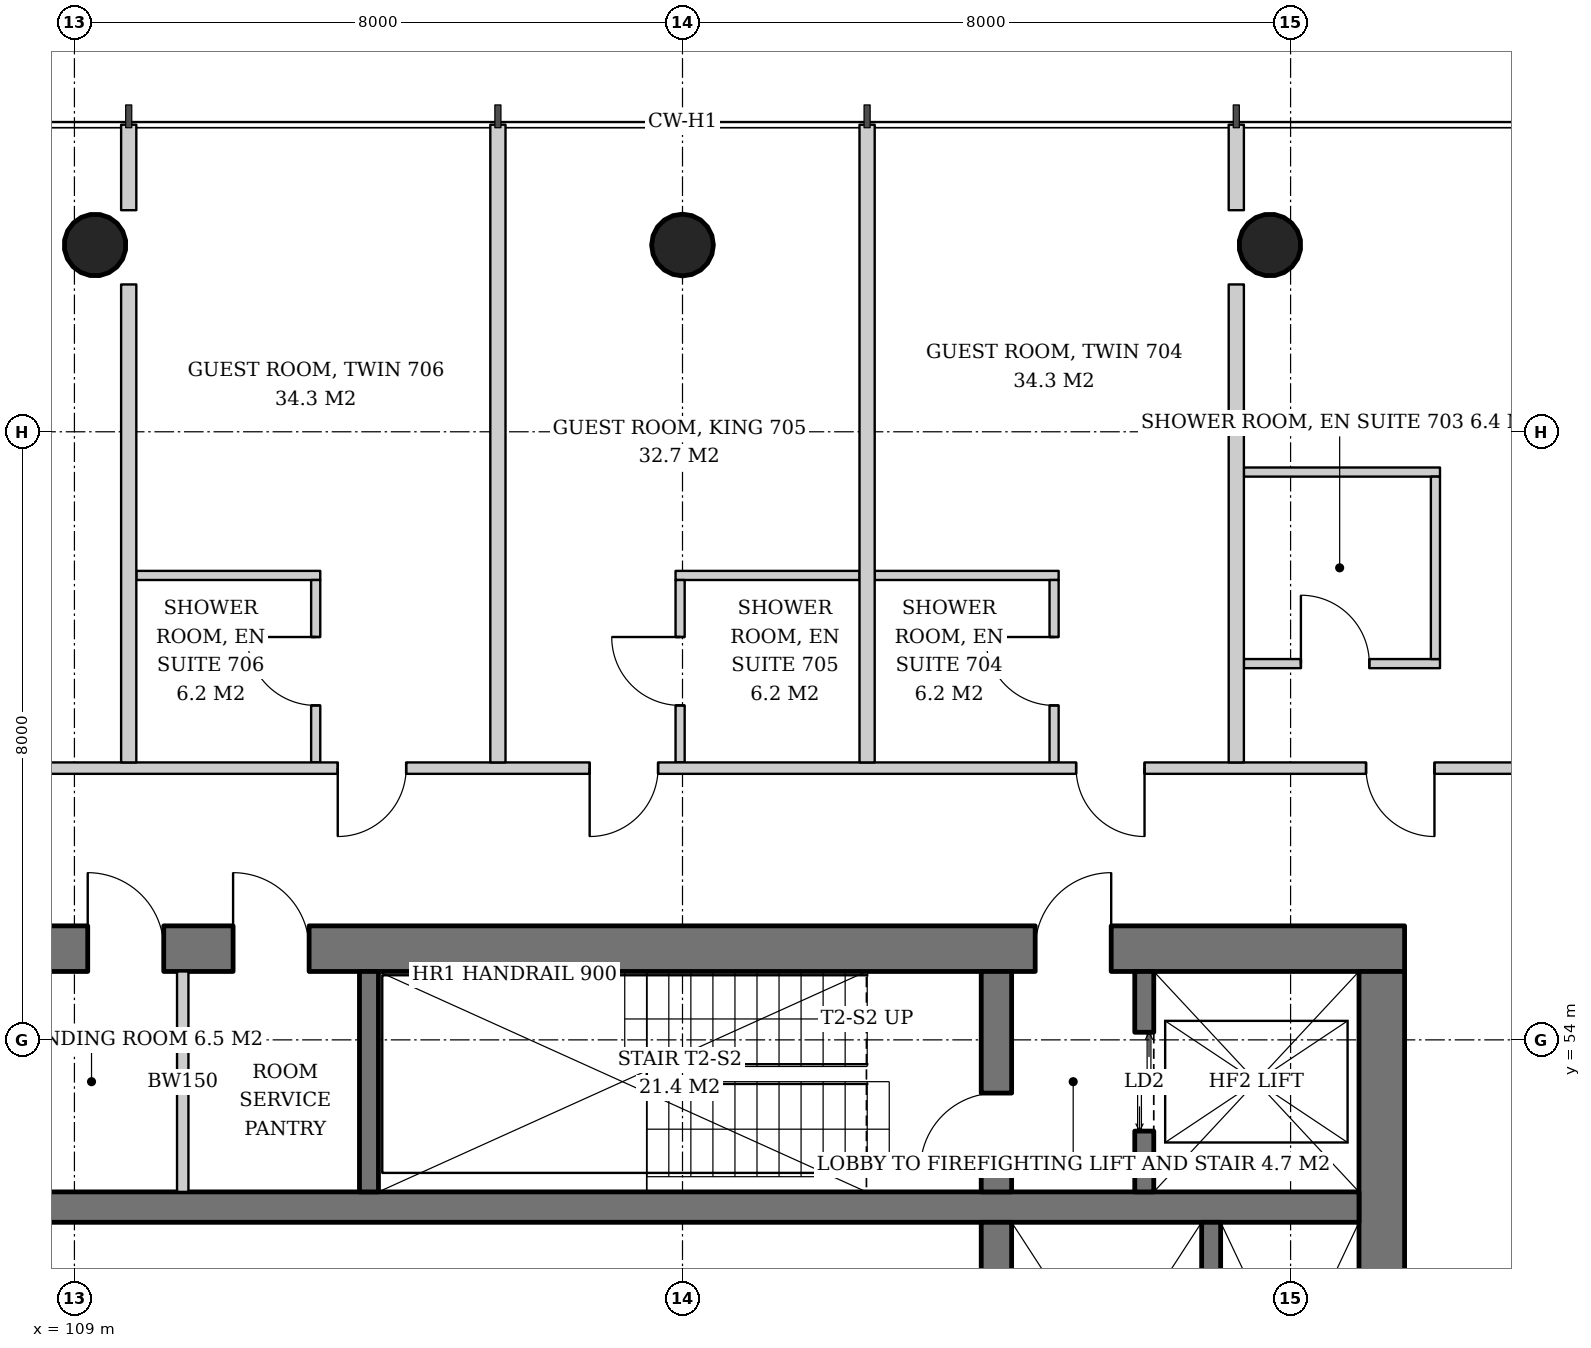
"""IFC4 building model, lengths in metres.
Left out: names, types, materials, properties, quantities, classifications, styles, units other than length and angle.
Written with IfcOpenShell. Run it as: python <this file> out.ifc"""

import sys

from ifc_helpers import new_model, si_unit, direction, frame, frame_2d, origin, origin_2d, place, context, subcontext, project, spatial, rectangle, hollow_circle, extrude, element, fill, save


model = new_model("IFC4")
c1 = context("Model", 3, precision=1e-05, world=origin(), true_north=direction((0.0, 1.0)))
c2 = subcontext(c1, "Body", "Model", "MODEL_VIEW")
j1 = project(units=[si_unit("LENGTHUNIT", "METRE"), si_unit("PLANEANGLEUNIT", "RADIAN")], contexts=[c1])
p1 = place(None, origin())
s1 = spatial("IfcSite", under=j1, at=p1, CompositionType="ELEMENT")
p2 = place(p1, origin())
s2 = spatial("IfcBuilding", under=s1, at=p2, CompositionType="ELEMENT")
p3 = place(p2, frame((0.0, 0.0, 32.4)))
s3 = spatial("IfcBuildingStorey", under=s2, at=p3, CompositionType="ELEMENT", Elevation=32.4)
p4 = place(p3, frame((124.754, 64.509, 0.0), z_axis=(-0.021561848751, -0.043059525333, 0.998839808957), x_axis=(0.894160516368, -0.44774654769, 0.0)))
e1 = element("IfcColumn", 1, at=p4, inside=s3, PredefinedType="COLUMN", context=c2, shape_type="SweptSolid", body=[
    extrude(hollow_circle(Radius=0.406, WallThickness=0.03, at=origin_2d()), origin(), (0.0, 0.0, 1.0), 3.804),
])
p5 = place(p3, frame((117.0, 64.509, 0.0), z_axis=(0.0, -0.043069538298, 0.999072076915), x_axis=(1.0, 0.0, 0.0)))
e2 = element("IfcColumn", 2, at=p5, inside=s3, PredefinedType="COLUMN", context=c2, shape_type="SweptSolid", body=[
    extrude(hollow_circle(Radius=0.406, WallThickness=0.03, at=origin_2d()), origin(), (0.0, 0.0, 1.0), 3.803),
])
p6 = place(p3, frame((109.246, 64.509, 0.0), z_axis=(0.021561848751, -0.043059525333, 0.998839808957), x_axis=(0.894160516368, 0.44774654769, 0.0)))
e3 = element("IfcColumn", 3, at=p6, inside=s3, PredefinedType="COLUMN", context=c2, shape_type="SweptSolid", body=[
    extrude(hollow_circle(Radius=0.406, WallThickness=0.03, at=origin_2d()), origin(), (0.0, 0.0, 1.0), 3.804),
])
p7 = place(p3, frame((107.5, 55.2, 0.0), z_axis=(0.0, 0.0, 1.0), x_axis=(1.0, 0.0, 0.0)))
e4 = element("IfcWall", 4, at=p7, inside=s3, PredefinedType="SHEAR", context=c2, shape_type="SweptSolid", body=[
    extrude(rectangle(XDim=19.0, YDim=0.6, at=frame_2d((9.5, 0.0))), origin(), (0.0, 0.0, 1.0), 3.8),
])
p8 = place(p7, frame((14.14, 0.0, 0.0)))
e5 = element("IfcOpeningElement", 5, at=p8, cuts=e4, PredefinedType="OPENING", context=c2, shape_type="SweptSolid", body=[
    extrude(rectangle(XDim=1.0, YDim=2.1, at=frame_2d((0.5, 1.05))), frame((0.0, 0.31, 0.0), z_axis=(0.0, -1.0, 0.0), x_axis=(1.0, 0.0, 0.0)), (0.0, 0.0, 1.0), 0.62),
])
p9 = place(p7, frame((1.675, 0.0, 0.0)))
e6 = element("IfcOpeningElement", 6, at=p9, cuts=e4, PredefinedType="OPENING", context=c2, shape_type="SweptSolid", body=[
    extrude(rectangle(XDim=1.0, YDim=2.1, at=frame_2d((0.5, 1.05))), frame((0.0, 0.31, 0.0), z_axis=(0.0, -1.0, 0.0), x_axis=(1.0, 0.0, 0.0)), (0.0, 0.0, 1.0), 0.62),
])
p10 = place(p7, frame((3.587, 0.0, 0.0)))
e7 = element("IfcOpeningElement", 7, at=p10, cuts=e4, PredefinedType="OPENING", context=c2, shape_type="SweptSolid", body=[
    extrude(rectangle(XDim=1.0, YDim=2.1, at=frame_2d((0.5, 1.05))), frame((0.0, 0.31, 0.0), z_axis=(0.0, -1.0, 0.0), x_axis=(1.0, 0.0, 0.0)), (0.0, 0.0, 1.0), 0.62),
])
p11 = place(p3, frame((126.2, 37.1, 0.0), z_axis=(0.0, 0.0, 1.0), x_axis=(0.0, 1.0, 0.0)))
e8 = element("IfcWall", 8, at=p11, inside=s3, PredefinedType="SHEAR", context=c2, shape_type="SweptSolid", body=[
    extrude(rectangle(XDim=17.8, YDim=0.6, at=frame_2d((8.9, 0.0))), origin(), (0.0, 0.0, 1.0), 3.8),
])
p12 = place(p11, frame((8.0, 0.0, 0.0)))
e9 = element("IfcOpeningElement", 9, at=p12, cuts=e8, PredefinedType="OPENING", context=c2, shape_type="SweptSolid", body=[
    extrude(rectangle(XDim=1.8, YDim=2.4, at=frame_2d((0.9, 1.2))), frame((0.0, 0.31, 0.0), z_axis=(0.0, -1.0, 0.0), x_axis=(1.0, 0.0, 0.0)), (0.0, 0.0, 1.0), 0.62),
])
p13 = place(p3, frame((108.1, 51.8, 0.0), z_axis=(0.0, 0.0, 1.0), x_axis=(1.0, 0.0, 0.0)))
e10 = element("IfcWall", 10, at=p13, inside=s3, PredefinedType="SHEAR", context=c2, shape_type="SweptSolid", body=[
    extrude(rectangle(XDim=17.8, YDim=0.4, at=frame_2d((8.9, 0.0))), origin(), (0.0, 0.0, 1.0), 3.8),
])
p14 = place(p3, frame((121.13, 40.4, 0.0), z_axis=(0.0, 0.0, 1.0), x_axis=(0.0, 1.0, 0.0)))
e11 = element("IfcWall", 11, at=p14, inside=s3, PredefinedType="SHEAR", context=c2, shape_type="SweptSolid", body=[
    extrude(rectangle(XDim=11.2, YDim=0.4, at=frame_2d((5.6, 0.0))), origin(), (0.0, 0.0, 1.0), 3.8),
])
p15 = place(p3, frame((121.13, 52.0, 0.0), z_axis=(0.0, 0.0, 1.0), x_axis=(0.0, 1.0, 0.0)))
e12 = element("IfcWall", 12, at=p15, inside=s3, PredefinedType="SHEAR", context=c2, shape_type="SweptSolid", body=[
    extrude(rectangle(XDim=2.9, YDim=0.4, at=frame_2d((1.45, 0.0))), origin(), (0.0, 0.0, 1.0), 3.8),
])
p16 = place(p15, frame((0.3, 0.0, 0.0)))
e13 = element("IfcOpeningElement", 13, at=p16, cuts=e12, PredefinedType="OPENING", context=c2, shape_type="SweptSolid", body=[
    extrude(rectangle(XDim=1.0, YDim=2.1, at=frame_2d((0.5, 1.05))), frame((0.0, 0.21, 0.0), z_axis=(0.0, -1.0, 0.0), x_axis=(1.0, 0.0, 0.0)), (0.0, 0.0, 1.0), 0.42),
])
p17 = place(p3, frame((112.875, 52.0, 0.0), z_axis=(0.0, 0.0, 1.0), x_axis=(0.0, 1.0, 0.0)))
e14 = element("IfcWall", 14, at=p17, inside=s3, PredefinedType="SHEAR", context=c2, shape_type="SweptSolid", body=[
    extrude(rectangle(XDim=2.9, YDim=0.25, at=frame_2d((1.45, 0.0))), origin(), (0.0, 0.0, 1.0), 3.8),
])
p18 = place(p3, frame((123.075, 52.0, 0.0), z_axis=(0.0, 0.0, 1.0), x_axis=(0.0, 1.0, 0.0)))
e15 = element("IfcWall", 15, at=p18, inside=s3, PredefinedType="SHEAR", context=c2, shape_type="SweptSolid", body=[
    extrude(rectangle(XDim=2.9, YDim=0.25, at=frame_2d((1.45, 0.0))), origin(), (0.0, 0.0, 1.0), 3.8),
])
p19 = place(p18, frame((0.8, 0.0, 0.0)))
e16 = element("IfcOpeningElement", 16, at=p19, cuts=e15, PredefinedType="OPENING", context=c2, shape_type="SweptSolid", body=[
    extrude(rectangle(XDim=1.3, YDim=2.2, at=frame_2d((0.65, 1.1))), frame((0.0, 0.135, 0.0), z_axis=(0.0, -1.0, 0.0), x_axis=(1.0, 0.0, 0.0)), (0.0, 0.0, 1.0), 0.27),
])
p20 = place(p3, frame((123.955, 47.75, 0.0), z_axis=(0.0, 0.0, 1.0), x_axis=(0.0, 1.0, 0.0)))
e17 = element("IfcWall", 17, at=p20, inside=s3, PredefinedType="SHEAR", context=c2, shape_type="SweptSolid", body=[
    extrude(rectangle(XDim=3.85, YDim=0.25, at=frame_2d((1.925, 0.0))), origin(), (0.0, 0.0, 1.0), 3.8),
])
p21 = place(p3, frame((110.425, 52.0, 0.0), z_axis=(0.0, 0.0, 1.0), x_axis=(0.0, 1.0, 0.0)))
e18 = element("IfcWall", 18, at=p21, inside=s3, PredefinedType="SOLIDWALL", context=c2, shape_type="SweptSolid", body=[
    extrude(rectangle(XDim=2.9, YDim=0.15, at=frame_2d((1.45, 0.0))), origin(), (0.0, 0.0, 1.0), 3.6),
])
p22 = place(p3, frame((124.386, 58.95, 0.0), z_axis=(0.0, 0.0, 1.0), x_axis=(1.0, 0.0, 0.0)))
e19 = element("IfcWall", 19, at=p22, inside=s3, PredefinedType="PARTITIONING", context=c2, shape_type="SweptSolid", body=[
    extrude(rectangle(XDim=2.58, YDim=0.12, at=frame_2d((1.29, 0.0))), origin(), (0.0, 0.0, 1.0), 2.8),
])
p23 = place(p22, frame((0.75, 0.0, 0.0)))
e20 = element("IfcOpeningElement", 20, at=p23, cuts=e19, PredefinedType="OPENING", context=c2, shape_type="SweptSolid", body=[
    extrude(rectangle(XDim=0.9, YDim=2.1, at=frame_2d((0.45, 1.05))), frame((0.0, 0.07, 0.0), z_axis=(0.0, -1.0, 0.0), x_axis=(1.0, 0.0, 0.0)), (0.0, 0.0, 1.0), 0.14),
])
p24 = place(p3, frame((124.386, 61.47, 0.0), z_axis=(0.0, 0.0, 1.0), x_axis=(1.0, 0.0, 0.0)))
e21 = element("IfcWall", 21, at=p24, inside=s3, PredefinedType="PARTITIONING", context=c2, shape_type="SweptSolid", body=[
    extrude(rectangle(XDim=2.58, YDim=0.12, at=frame_2d((1.29, 0.0))), origin(), (0.0, 0.0, 1.0), 2.8),
])
p25 = place(p3, frame((126.906, 59.01, 0.0), z_axis=(0.0, 0.0, 1.0), x_axis=(0.0, 1.0, 0.0)))
e22 = element("IfcWall", 22, at=p25, inside=s3, PredefinedType="PARTITIONING", context=c2, shape_type="SweptSolid", body=[
    extrude(rectangle(XDim=2.4, YDim=0.12, at=frame_2d((1.2, 0.0))), origin(), (0.0, 0.0, 1.0), 2.847),
])
p26 = place(p3, frame((121.948, 60.11, 0.0), z_axis=(0.0, 0.0, 1.0), x_axis=(-1.0, 0.0, 0.0)))
e23 = element("IfcWall", 23, at=p26, inside=s3, PredefinedType="PARTITIONING", context=c2, shape_type="SweptSolid", body=[
    extrude(rectangle(XDim=2.42, YDim=0.12, at=frame_2d((1.21, 0.0))), origin(), (0.0, 0.0, 1.0), 3.6),
])
p27 = place(p3, frame((121.889, 57.65, 0.0), z_axis=(0.0, 0.0, 1.0), x_axis=(0.0, 1.0, 0.0)))
e24 = element("IfcWall", 24, at=p27, inside=s3, PredefinedType="PARTITIONING", context=c2, shape_type="SweptSolid", body=[
    extrude(rectangle(XDim=2.4, YDim=0.12, at=frame_2d((1.2, 0.0))), origin(), (0.0, 0.0, 1.0), 3.6),
])
p28 = place(p27, frame((0.75, 0.0, 0.0)))
e25 = element("IfcOpeningElement", 25, at=p28, cuts=e24, PredefinedType="OPENING", context=c2, shape_type="SweptSolid", body=[
    extrude(rectangle(XDim=0.9, YDim=2.1, at=frame_2d((0.45, 1.05))), frame((0.0, 0.07, 0.0), z_axis=(0.0, -1.0, 0.0), x_axis=(1.0, 0.0, 0.0)), (0.0, 0.0, 1.0), 0.14),
])
p29 = place(p3, frame((119.329, 60.11, 0.0), z_axis=(0.0, 0.0, 1.0), x_axis=(-1.0, 0.0, 0.0)))
e26 = element("IfcWall", 26, at=p29, inside=s3, PredefinedType="PARTITIONING", context=c2, shape_type="SweptSolid", body=[
    extrude(rectangle(XDim=2.42, YDim=0.12, at=frame_2d((1.21, 0.0))), origin(), (0.0, 0.0, 1.0), 2.847),
])
p30 = place(p3, frame((116.969, 57.65, 0.0), z_axis=(0.0, 0.0, 1.0), x_axis=(0.0, 1.0, 0.0)))
e27 = element("IfcWall", 27, at=p30, inside=s3, PredefinedType="PARTITIONING", context=c2, shape_type="SweptSolid", body=[
    extrude(rectangle(XDim=2.4, YDim=0.12, at=frame_2d((1.2, 0.0))), origin(), (0.0, 0.0, 1.0), 3.6),
])
p31 = place(p30, frame((0.75, 0.0, 0.0)))
e28 = element("IfcOpeningElement", 28, at=p31, cuts=e27, PredefinedType="OPENING", context=c2, shape_type="SweptSolid", body=[
    extrude(rectangle(XDim=0.9, YDim=2.1, at=frame_2d((0.45, 1.05))), frame((0.0, 0.07, 0.0), z_axis=(0.0, -1.0, 0.0), x_axis=(1.0, 0.0, 0.0)), (0.0, 0.0, 1.0), 0.14),
])
p32 = place(p3, frame((112.234, 60.11, 0.0), z_axis=(0.0, 0.0, 1.0), x_axis=(-1.0, 0.0, 0.0)))
e29 = element("IfcWall", 29, at=p32, inside=s3, PredefinedType="PARTITIONING", context=c2, shape_type="SweptSolid", body=[
    extrude(rectangle(XDim=2.42, YDim=0.12, at=frame_2d((1.21, 0.0))), origin(), (0.0, 0.0, 1.0), 2.847),
])
p33 = place(p3, frame((112.174, 57.65, 0.0), z_axis=(0.0, 0.0, 1.0), x_axis=(0.0, 1.0, 0.0)))
e30 = element("IfcWall", 30, at=p33, inside=s3, PredefinedType="PARTITIONING", context=c2, shape_type="SweptSolid", body=[
    extrude(rectangle(XDim=2.4, YDim=0.12, at=frame_2d((1.2, 0.0))), origin(), (0.0, 0.0, 1.0), 3.6),
])
p34 = place(p33, frame((0.75, 0.0, 0.0)))
e31 = element("IfcOpeningElement", 31, at=p34, cuts=e30, PredefinedType="OPENING", context=c2, shape_type="SweptSolid", body=[
    extrude(rectangle(XDim=0.9, YDim=2.1, at=frame_2d((0.45, 1.05))), frame((0.0, 0.07, 0.0), z_axis=(0.0, -1.0, 0.0), x_axis=(1.0, 0.0, 0.0)), (0.0, 0.0, 1.0), 0.14),
])
p35 = place(p3, frame((128.65, 57.575, 0.0), z_axis=(0.0, 0.0, 1.0), x_axis=(-1.0, 0.0, 0.0)))
e32 = element("IfcWall", 32, at=p35, inside=s3, PredefinedType="PARTITIONING", context=c2, shape_type="SweptSolid", body=[
    extrude(rectangle(XDim=23.15, YDim=0.15, at=frame_2d((11.575, 0.0))), origin(), (0.0, 0.0, 1.0), 2.8),
])
p36 = place(p35, frame((1.757, 0.0, 0.0)))
e33 = element("IfcOpeningElement", 33, at=p36, cuts=e32, PredefinedType="OPENING", context=c2, shape_type="SweptSolid", body=[
    extrude(rectangle(XDim=0.9, YDim=2.1, at=frame_2d((0.45, 1.05))), frame((0.0, 0.085, 0.0), z_axis=(0.0, -1.0, 0.0), x_axis=(1.0, 0.0, 0.0)), (0.0, 0.0, 1.0), 0.17),
])
p37 = place(p35, frame((5.572, 0.0, 0.0)))
e34 = element("IfcOpeningElement", 34, at=p37, cuts=e32, PredefinedType="OPENING", context=c2, shape_type="SweptSolid", body=[
    extrude(rectangle(XDim=0.9, YDim=2.1, at=frame_2d((0.45, 1.05))), frame((0.0, 0.085, 0.0), z_axis=(0.0, -1.0, 0.0), x_axis=(1.0, 0.0, 0.0)), (0.0, 0.0, 1.0), 0.17),
])
p38 = place(p35, frame((11.971, 0.0, 0.0)))
e35 = element("IfcOpeningElement", 35, at=p38, cuts=e32, PredefinedType="OPENING", context=c2, shape_type="SweptSolid", body=[
    extrude(rectangle(XDim=0.9, YDim=2.1, at=frame_2d((0.45, 1.05))), frame((0.0, 0.085, 0.0), z_axis=(0.0, -1.0, 0.0), x_axis=(1.0, 0.0, 0.0)), (0.0, 0.0, 1.0), 0.17),
])
p39 = place(p35, frame((15.286, 0.0, 0.0)))
e36 = element("IfcOpeningElement", 36, at=p39, cuts=e32, PredefinedType="OPENING", context=c2, shape_type="SweptSolid", body=[
    extrude(rectangle(XDim=0.9, YDim=2.1, at=frame_2d((0.45, 1.05))), frame((0.0, 0.085, 0.0), z_axis=(0.0, -1.0, 0.0), x_axis=(1.0, 0.0, 0.0)), (0.0, 0.0, 1.0), 0.17),
])
p40 = place(p3, frame((124.286, 57.65, 0.0), z_axis=(0.0, 0.0, 1.0), x_axis=(0.0, 1.0, 0.0)))
e37 = element("IfcWall", 37, at=p40, inside=s3, PredefinedType="PARTITIONING", context=c2, shape_type="SweptSolid", body=[
    extrude(rectangle(XDim=6.288, YDim=0.2, at=frame_2d((3.144, 0.0))), origin(), (0.0, 0.0, 1.0), 3.6),
])
p41 = place(p3, frame((124.286, 64.915, 0.0), z_axis=(0.0, 0.0, 1.0), x_axis=(0.0, 1.0, 0.0)))
e38 = element("IfcWall", 38, at=p41, inside=s3, PredefinedType="PARTITIONING", context=c2, shape_type="SweptSolid", body=[
    extrude(rectangle(XDim=1.125, YDim=0.2, at=frame_2d((0.562, 0.0))), origin(), (0.0, 0.0, 1.0), 3.6),
])
p42 = place(p3, frame((119.428, 57.65, 0.0), z_axis=(0.0, 0.0, 1.0), x_axis=(0.0, 1.0, 0.0)))
e39 = element("IfcWall", 39, at=p42, inside=s3, PredefinedType="PARTITIONING", context=c2, shape_type="SweptSolid", body=[
    extrude(rectangle(XDim=8.39, YDim=0.2, at=frame_2d((4.195, 0.0))), origin(), (0.0, 0.0, 1.0), 3.05),
])
p43 = place(p3, frame((114.572, 57.65, 0.0), z_axis=(0.0, 0.0, 1.0), x_axis=(0.0, 1.0, 0.0)))
e40 = element("IfcWall", 40, at=p43, inside=s3, PredefinedType="PARTITIONING", context=c2, shape_type="SweptSolid", body=[
    extrude(rectangle(XDim=8.39, YDim=0.2, at=frame_2d((4.195, 0.0))), origin(), (0.0, 0.0, 1.0), 2.847),
])
p44 = place(p3, frame((109.714, 57.65, 0.0), z_axis=(0.0, 0.0, 1.0), x_axis=(0.0, 1.0, 0.0)))
e41 = element("IfcWall", 41, at=p44, inside=s3, PredefinedType="PARTITIONING", context=c2, shape_type="SweptSolid", body=[
    extrude(rectangle(XDim=6.288, YDim=0.2, at=frame_2d((3.144, 0.0))), origin(), (0.0, 0.0, 1.0), 3.6),
])
p45 = place(p3, frame((109.714, 64.915, 0.0), z_axis=(0.0, 0.0, 1.0), x_axis=(0.0, 1.0, 0.0)))
e42 = element("IfcWall", 42, at=p45, inside=s3, PredefinedType="PARTITIONING", context=c2, shape_type="SweptSolid", body=[
    extrude(rectangle(XDim=1.125, YDim=0.2, at=frame_2d((0.562, 0.0))), origin(), (0.0, 0.0, 1.0), 3.6),
])
p46 = place(p19, origin())
e43 = element("IfcDoor", 43, at=p46, inside=s3, OperationType="DOUBLE_DOOR_SLIDING", PredefinedType="DOOR", context=c2, shape_type="SweptSolid", body=[
    extrude(rectangle(XDim=1.3, YDim=2.2, at=frame_2d((0.65, 1.1))), frame((0.0, 0.025, 0.0), z_axis=(0.0, -1.0, 0.0), x_axis=(1.0, 0.0, 0.0)), (0.0, 0.0, 1.0), 0.05),
])
fill(e16, e43)
p47 = place(p16, origin())
e44 = element("IfcDoor", 44, at=p47, inside=s3, OperationType="SINGLE_SWING_LEFT", PredefinedType="DOOR", context=c2, shape_type="SweptSolid", body=[
    extrude(rectangle(XDim=1.0, YDim=2.1, at=frame_2d((0.5, 1.05))), frame((0.0, 0.025, 0.0), z_axis=(0.0, -1.0, 0.0), x_axis=(1.0, 0.0, 0.0)), (0.0, 0.0, 1.0), 0.05),
])
fill(e13, e44)
p48 = place(p8, origin())
e45 = element("IfcDoor", 45, at=p48, inside=s3, OperationType="SINGLE_SWING_RIGHT", PredefinedType="DOOR", context=c2, shape_type="SweptSolid", body=[
    extrude(rectangle(XDim=1.0, YDim=2.1, at=frame_2d((0.5, 1.05))), frame((0.0, 0.025, 0.0), z_axis=(0.0, -1.0, 0.0), x_axis=(1.0, 0.0, 0.0)), (0.0, 0.0, 1.0), 0.05),
])
fill(e5, e45)
p49 = place(p9, origin())
e46 = element("IfcDoor", 46, at=p49, inside=s3, OperationType="SINGLE_SWING_LEFT", PredefinedType="DOOR", context=c2, shape_type="SweptSolid", body=[
    extrude(rectangle(XDim=1.0, YDim=2.1, at=frame_2d((0.5, 1.05))), frame((0.0, -0.24, 0.0), z_axis=(0.0, -1.0, 0.0), x_axis=(1.0, 0.0, 0.0)), (0.0, 0.0, 1.0), 0.05),
])
fill(e6, e46)
p50 = place(p10, origin())
e47 = element("IfcDoor", 47, at=p50, inside=s3, OperationType="SINGLE_SWING_LEFT", PredefinedType="DOOR", context=c2, shape_type="SweptSolid", body=[
    extrude(rectangle(XDim=1.0, YDim=2.1, at=frame_2d((0.5, 1.05))), frame((0.0, -0.24, 0.0), z_axis=(0.0, -1.0, 0.0), x_axis=(1.0, 0.0, 0.0)), (0.0, 0.0, 1.0), 0.05),
])
fill(e7, e47)
p51 = place(p23, origin())
e48 = element("IfcDoor", 48, at=p51, inside=s3, OperationType="SINGLE_SWING_LEFT", PredefinedType="DOOR", context=c2, shape_type="SweptSolid", body=[
    extrude(rectangle(XDim=0.9, YDim=2.1, at=frame_2d((0.45, 1.05))), frame((0.0, 0.025, 0.0), z_axis=(0.0, -1.0, 0.0), x_axis=(1.0, 0.0, 0.0)), (0.0, 0.0, 1.0), 0.05),
])
fill(e20, e48)
p52 = place(p28, origin())
e49 = element("IfcDoor", 49, at=p52, inside=s3, OperationType="SINGLE_SWING_RIGHT", PredefinedType="DOOR", context=c2, shape_type="SweptSolid", body=[
    extrude(rectangle(XDim=0.9, YDim=2.1, at=frame_2d((0.45, 1.05))), frame((0.0, 0.025, 0.0), z_axis=(0.0, -1.0, 0.0), x_axis=(1.0, 0.0, 0.0)), (0.0, 0.0, 1.0), 0.05),
])
fill(e25, e49)
p53 = place(p31, origin())
e50 = element("IfcDoor", 50, at=p53, inside=s3, OperationType="SINGLE_SWING_RIGHT", PredefinedType="DOOR", context=c2, shape_type="SweptSolid", body=[
    extrude(rectangle(XDim=0.9, YDim=2.1, at=frame_2d((0.45, 1.05))), frame((0.0, 0.025, 0.0), z_axis=(0.0, -1.0, 0.0), x_axis=(1.0, 0.0, 0.0)), (0.0, 0.0, 1.0), 0.05),
])
fill(e28, e50)
p54 = place(p34, origin())
e51 = element("IfcDoor", 51, at=p54, inside=s3, OperationType="SINGLE_SWING_RIGHT", PredefinedType="DOOR", context=c2, shape_type="SweptSolid", body=[
    extrude(rectangle(XDim=0.9, YDim=2.1, at=frame_2d((0.45, 1.05))), frame((0.0, 0.025, 0.0), z_axis=(0.0, -1.0, 0.0), x_axis=(1.0, 0.0, 0.0)), (0.0, 0.0, 1.0), 0.05),
])
fill(e31, e51)
p55 = place(p36, origin())
e52 = element("IfcDoor", 52, at=p55, inside=s3, OperationType="SINGLE_SWING_LEFT", PredefinedType="DOOR", context=c2, shape_type="SweptSolid", body=[
    extrude(rectangle(XDim=0.9, YDim=2.1, at=frame_2d((0.45, 1.05))), frame((0.0, 0.025, 0.0), z_axis=(0.0, -1.0, 0.0), x_axis=(1.0, 0.0, 0.0)), (0.0, 0.0, 1.0), 0.05),
])
fill(e33, e52)
p56 = place(p37, origin())
e53 = element("IfcDoor", 53, at=p56, inside=s3, OperationType="SINGLE_SWING_LEFT", PredefinedType="DOOR", context=c2, shape_type="SweptSolid", body=[
    extrude(rectangle(XDim=0.9, YDim=2.1, at=frame_2d((0.45, 1.05))), frame((0.0, 0.025, 0.0), z_axis=(0.0, -1.0, 0.0), x_axis=(1.0, 0.0, 0.0)), (0.0, 0.0, 1.0), 0.05),
])
fill(e34, e53)
p57 = place(p38, origin())
e54 = element("IfcDoor", 54, at=p57, inside=s3, OperationType="SINGLE_SWING_RIGHT", PredefinedType="DOOR", context=c2, shape_type="SweptSolid", body=[
    extrude(rectangle(XDim=0.9, YDim=2.1, at=frame_2d((0.45, 1.05))), frame((0.0, 0.025, 0.0), z_axis=(0.0, -1.0, 0.0), x_axis=(1.0, 0.0, 0.0)), (0.0, 0.0, 1.0), 0.05),
])
fill(e35, e54)
p58 = place(p39, origin())
e55 = element("IfcDoor", 55, at=p58, inside=s3, OperationType="SINGLE_SWING_RIGHT", PredefinedType="DOOR", context=c2, shape_type="SweptSolid", body=[
    extrude(rectangle(XDim=0.9, YDim=2.1, at=frame_2d((0.45, 1.05))), frame((0.0, 0.025, 0.0), z_axis=(0.0, -1.0, 0.0), x_axis=(1.0, 0.0, 0.0)), (0.0, 0.0, 1.0), 0.05),
])
fill(e36, e55)
save(model, sys.argv[1])
